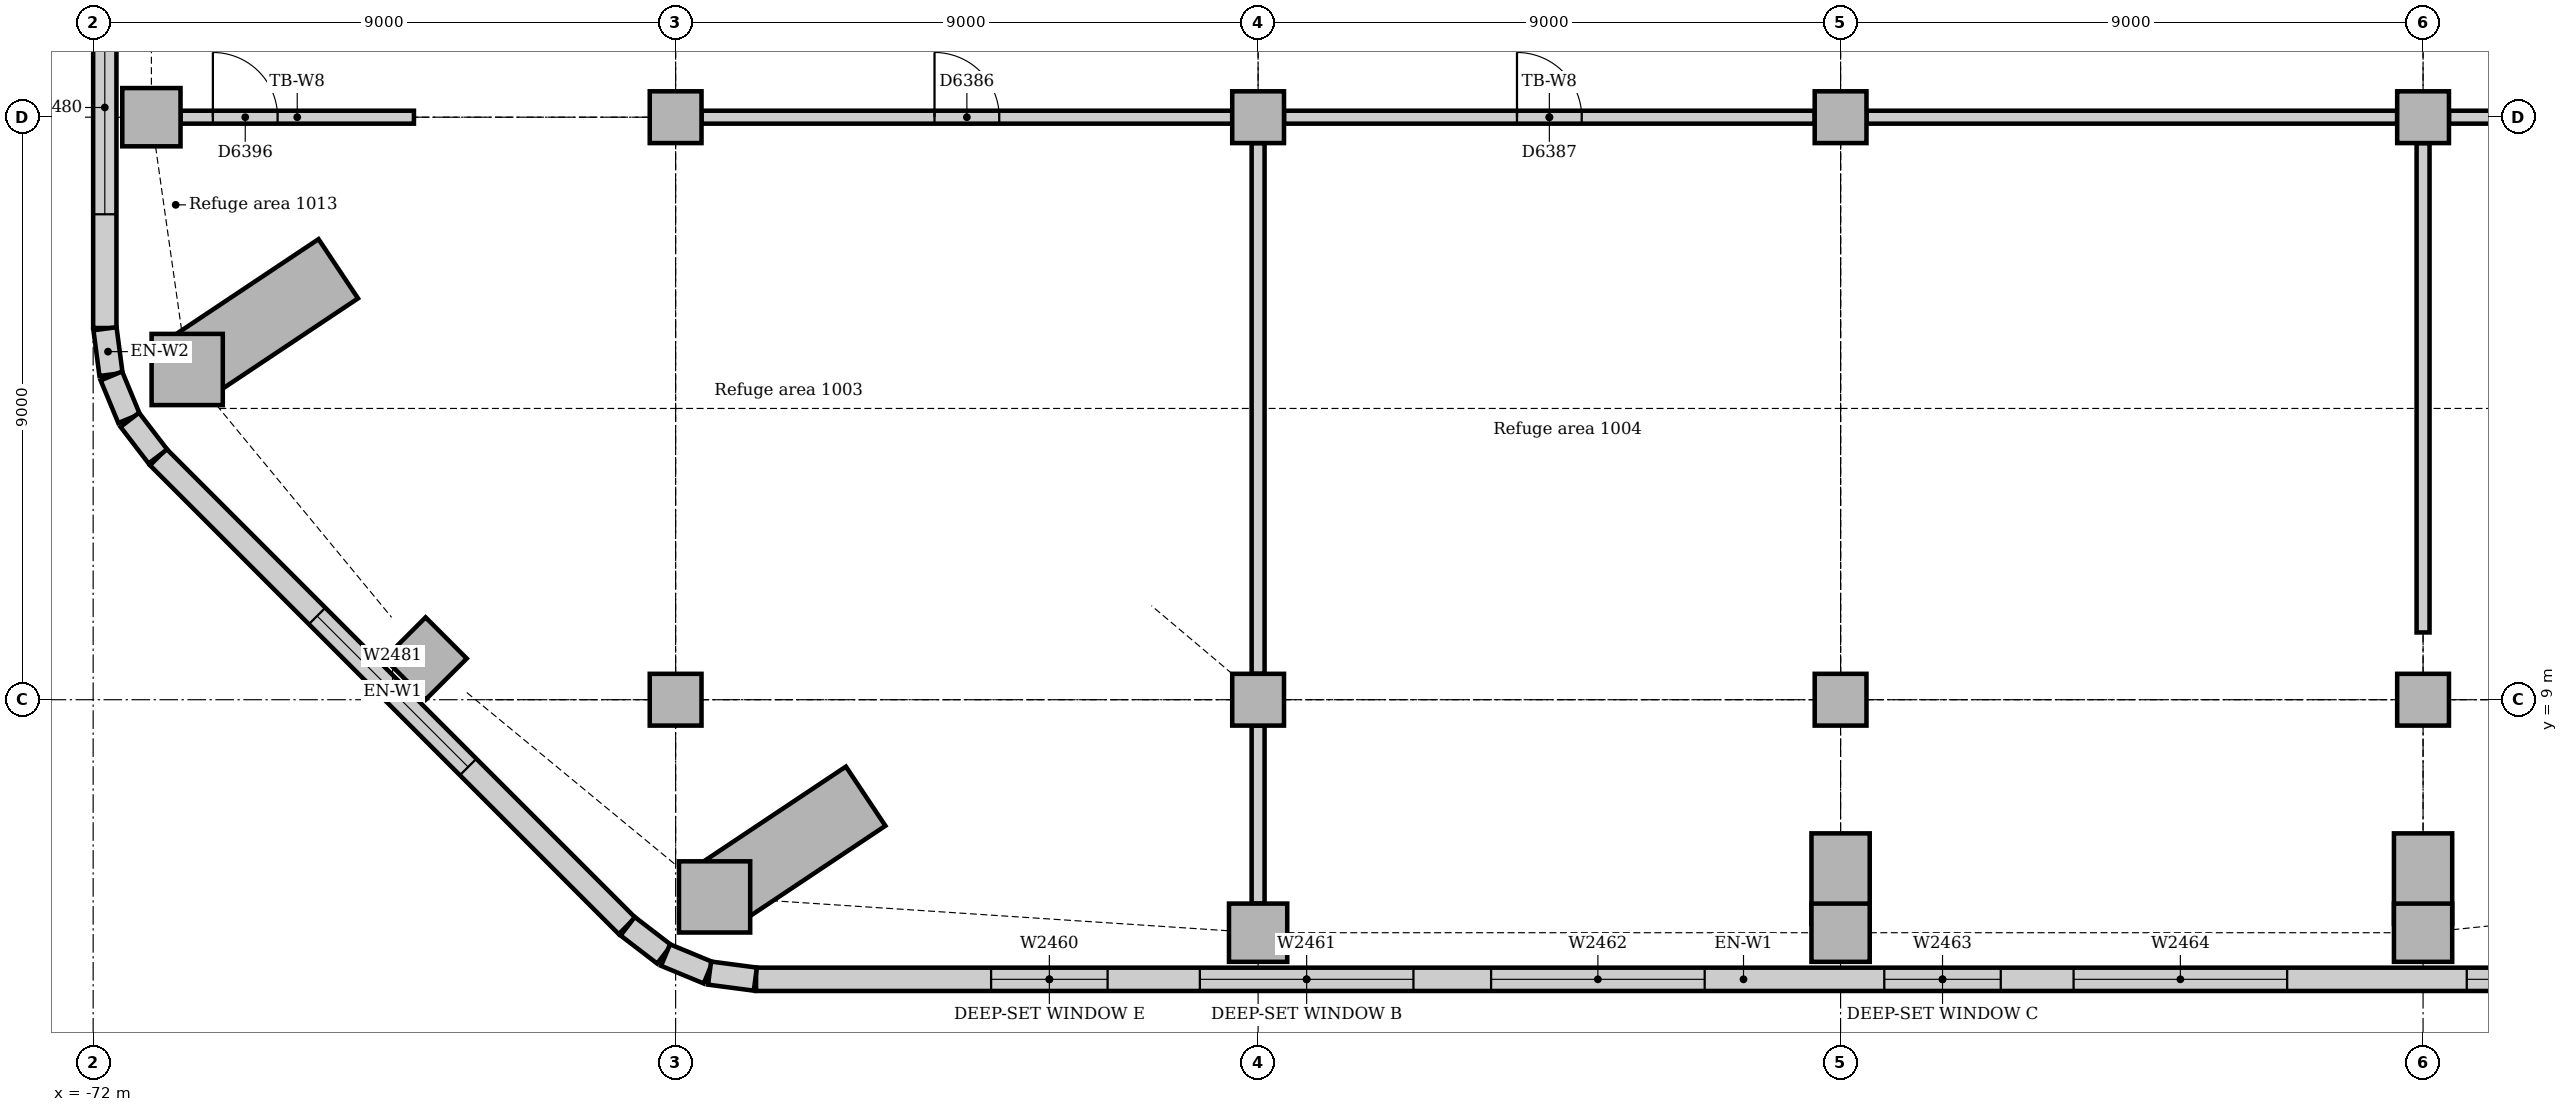
"""IFC4 building model, lengths in metres.
Left out: names, types, materials, properties, quantities, classifications, styles, units other than length and angle.
Written with IfcOpenShell. Run it as: python <this file> out.ifc"""

import sys

from ifc_helpers import new_model, si_unit, direction, frame, frame_2d, origin, origin_2d, place, context, subcontext, project, spatial, rectangle, extrude, element, fill, save


model = new_model("IFC4")
c1 = context("Model", 3, precision=1e-05, world=origin(), true_north=direction((0.0, 1.0)))
c2 = subcontext(c1, "Body", "Model", "MODEL_VIEW")
j1 = project(units=[si_unit("LENGTHUNIT", "METRE"), si_unit("PLANEANGLEUNIT", "RADIAN")], contexts=[c1])
p1 = place(None, origin())
s1 = spatial("IfcSite", under=j1, at=p1, CompositionType="ELEMENT")
p2 = place(p1, origin())
s2 = spatial("IfcBuilding", under=s1, at=p2, CompositionType="ELEMENT")
p3 = place(p2, frame((0.0, 0.0, 46.0)))
s3 = spatial("IfcBuildingStorey", under=s2, at=p3, CompositionType="ELEMENT", Elevation=46.0)
for number, where, z_axis, x_axis in (
    (1, (-62.398, 5.953, 0.0), (0.0, 0.0, 1.0), (1.0, 0.0, 0.0)),
    (2, (-70.547, 14.102, 0.0), (0.0, 0.0, 1.0), (1.0, 0.0, 0.0)),
):
    element("IfcColumn", number, at=place(p3, frame(where, z_axis=z_axis, x_axis=x_axis)), inside=s3, PredefinedType="COLUMN", context=c2, shape_type="SweptSolid", body=[
        extrude(rectangle(XDim=1.1, YDim=1.1, at=origin_2d()), origin(), (0.0, 0.0, 1.0), 4.85),
    ])
for number, where, z_axis, x_axis in (
    (3, (-54.0, 5.4, 0.0), (0.0, 0.0, 1.0), (1.0, 0.0, 0.0)),
    (4, (-45.0, 5.4, 0.0), (0.0, 0.0, 1.0), (1.0, 0.0, 0.0)),
    (5, (-36.0, 5.4, 0.0), (0.0, 0.0, 1.0), (1.0, 0.0, 0.0)),
    (6, (-71.1, 18.0, 0.0), (0.0, 0.0, 1.0), (1.0, 0.0, 0.0)),
    (7, (-66.864, 9.636, 0.0), (0.0, 0.0, 1.0), (0.707, 0.707, 0.0)),
):
    element("IfcColumn", number, at=place(p3, frame(where, z_axis=z_axis, x_axis=x_axis)), inside=s3, PredefinedType="COLUMN", context=c2, shape_type="SweptSolid", body=[
        extrude(rectangle(XDim=0.9, YDim=0.9, at=origin_2d()), origin(), (0.0, 0.0, 1.0), 4.85),
    ])
for number, where, z_axis, x_axis in (
    (8, (-63.0, 9.0, 0.0), (0.0, 0.0, 1.0), (1.0, 0.0, 0.0)),
    (9, (-63.0, 18.0, 0.0), (0.0, 0.0, 1.0), (1.0, 0.0, 0.0)),
    (10, (-54.0, 9.0, 0.0), (0.0, 0.0, 1.0), (1.0, 0.0, 0.0)),
    (11, (-54.0, 18.0, 0.0), (0.0, 0.0, 1.0), (1.0, 0.0, 0.0)),
    (12, (-45.0, 9.0, 0.0), (0.0, 0.0, 1.0), (1.0, 0.0, 0.0)),
    (13, (-45.0, 18.0, 0.0), (0.0, 0.0, 1.0), (1.0, 0.0, 0.0)),
    (14, (-36.0, 9.0, 0.0), (0.0, 0.0, 1.0), (1.0, 0.0, 0.0)),
    (15, (-36.0, 18.0, 0.0), (0.0, 0.0, 1.0), (1.0, 0.0, 0.0)),
):
    element("IfcColumn", number, at=place(p3, frame(where, z_axis=z_axis, x_axis=x_axis)), inside=s3, PredefinedType="COLUMN", context=c2, shape_type="SweptSolid", body=[
        extrude(rectangle(XDim=0.8, YDim=0.8, at=origin_2d()), origin(), (0.0, 0.0, 1.0), 4.85),
    ])
p4 = place(p3, frame((-61.757, 4.68, 0.0), z_axis=(0.0, 0.0, 1.0), x_axis=(1.0, 0.0, 0.0)))
e16 = element("IfcWall", 16, at=p4, inside=s3, PredefinedType="STANDARD", context=c2, shape_type="SweptSolid", body=[
    extrude(rectangle(XDim=30.515, YDim=0.36, at=frame_2d((15.257, 0.0))), origin(), (0.0, 0.0, 1.0), 4.85),
])
p5 = place(p4, frame((3.632, 0.0, 0.9)))
e17 = element("IfcOpeningElement", 17, at=p5, cuts=e16, PredefinedType="OPENING", context=c2, shape_type="SweptSolid", body=[
    extrude(rectangle(XDim=1.8, YDim=2.2, at=frame_2d((0.9, 1.1))), frame((0.0, 0.19, 0.0), z_axis=(0.0, -1.0, 0.0), x_axis=(1.0, 0.0, 0.0)), (0.0, 0.0, 1.0), 0.38),
])
p6 = place(p4, frame((6.857, 0.0, 0.9)))
e18 = element("IfcOpeningElement", 18, at=p6, cuts=e16, PredefinedType="OPENING", context=c2, shape_type="SweptSolid", body=[
    extrude(rectangle(XDim=3.3, YDim=2.2, at=frame_2d((1.65, 1.1))), frame((0.0, 0.19, 0.0), z_axis=(0.0, -1.0, 0.0), x_axis=(1.0, 0.0, 0.0)), (0.0, 0.0, 1.0), 0.38),
])
p7 = place(p4, frame((11.357, 0.0, 0.9)))
e19 = element("IfcOpeningElement", 19, at=p7, cuts=e16, PredefinedType="OPENING", context=c2, shape_type="SweptSolid", body=[
    extrude(rectangle(XDim=3.3, YDim=2.2, at=frame_2d((1.65, 1.1))), frame((0.0, 0.19, 0.0), z_axis=(0.0, -1.0, 0.0), x_axis=(1.0, 0.0, 0.0)), (0.0, 0.0, 1.0), 0.38),
])
p8 = place(p4, frame((17.432, 0.0, 1.2)))
e20 = element("IfcOpeningElement", 20, at=p8, cuts=e16, PredefinedType="OPENING", context=c2, shape_type="SweptSolid", body=[
    extrude(rectangle(XDim=1.8, YDim=1.2, at=frame_2d((0.9, 0.6))), frame((0.0, 0.19, 0.0), z_axis=(0.0, -1.0, 0.0), x_axis=(1.0, 0.0, 0.0)), (0.0, 0.0, 1.0), 0.38),
])
p9 = place(p4, frame((20.357, 0.0, 0.9)))
e21 = element("IfcOpeningElement", 21, at=p9, cuts=e16, PredefinedType="OPENING", context=c2, shape_type="SweptSolid", body=[
    extrude(rectangle(XDim=3.3, YDim=2.2, at=frame_2d((1.65, 1.1))), frame((0.0, 0.19, 0.0), z_axis=(0.0, -1.0, 0.0), x_axis=(1.0, 0.0, 0.0)), (0.0, 0.0, 1.0), 0.38),
])
p10 = place(p4, frame((26.432, 0.0, 1.2)))
e22 = element("IfcOpeningElement", 22, at=p10, cuts=e16, PredefinedType="OPENING", context=c2, shape_type="SweptSolid", body=[
    extrude(rectangle(XDim=1.8, YDim=1.2, at=frame_2d((0.9, 0.6))), frame((0.0, 0.19, 0.0), z_axis=(0.0, -1.0, 0.0), x_axis=(1.0, 0.0, 0.0)), (0.0, 0.0, 1.0), 0.38),
])
p11 = place(p3, frame((-71.82, 40.757, 0.0), z_axis=(0.0, 0.0, 1.0), x_axis=(0.0, -1.0, 0.0)))
e23 = element("IfcWall", 23, at=p11, inside=s3, PredefinedType="STANDARD", context=c2, shape_type="SweptSolid", body=[
    extrude(rectangle(XDim=26.015, YDim=0.36, at=frame_2d((13.007, 0.0))), origin(), (0.0, 0.0, 1.0), 4.85),
])
p12 = place(p11, frame((2.282, 0.0, 1.2)))
e24 = element("IfcOpeningElement", 24, at=p12, cuts=e23, PredefinedType="OPENING", context=c2, shape_type="SweptSolid", body=[
    extrude(rectangle(XDim=1.8, YDim=1.2, at=frame_2d((0.9, 0.6))), frame((0.0, 0.19, 0.0), z_axis=(0.0, -1.0, 0.0), x_axis=(1.0, 0.0, 0.0)), (0.0, 0.0, 1.0), 0.38),
])
p13 = place(p11, frame((6.857, 0.0, 0.9)))
e25 = element("IfcOpeningElement", 25, at=p13, cuts=e23, PredefinedType="OPENING", context=c2, shape_type="SweptSolid", body=[
    extrude(rectangle(XDim=3.3, YDim=2.2, at=frame_2d((1.65, 1.1))), frame((0.0, 0.19, 0.0), z_axis=(0.0, -1.0, 0.0), x_axis=(1.0, 0.0, 0.0)), (0.0, 0.0, 1.0), 0.38),
])
p14 = place(p11, frame((11.282, 0.0, 1.2)))
e26 = element("IfcOpeningElement", 26, at=p14, cuts=e23, PredefinedType="OPENING", context=c2, shape_type="SweptSolid", body=[
    extrude(rectangle(XDim=1.8, YDim=1.2, at=frame_2d((0.9, 0.6))), frame((0.0, 0.19, 0.0), z_axis=(0.0, -1.0, 0.0), x_axis=(1.0, 0.0, 0.0)), (0.0, 0.0, 1.0), 0.38),
])
p15 = place(p11, frame((15.857, 0.0, 0.9)))
e27 = element("IfcOpeningElement", 27, at=p15, cuts=e23, PredefinedType="OPENING", context=c2, shape_type="SweptSolid", body=[
    extrude(rectangle(XDim=3.3, YDim=2.2, at=frame_2d((1.65, 1.1))), frame((0.0, 0.19, 0.0), z_axis=(0.0, -1.0, 0.0), x_axis=(1.0, 0.0, 0.0)), (0.0, 0.0, 1.0), 0.38),
])
p16 = place(p11, frame((20.957, 0.0, 0.9)))
e28 = element("IfcOpeningElement", 28, at=p16, cuts=e23, PredefinedType="OPENING", context=c2, shape_type="SweptSolid", body=[
    extrude(rectangle(XDim=3.3, YDim=2.2, at=frame_2d((1.65, 1.1))), frame((0.0, 0.19, 0.0), z_axis=(0.0, -1.0, 0.0), x_axis=(1.0, 0.0, 0.0)), (0.0, 0.0, 1.0), 0.38),
])
p17 = place(p3, frame((-70.994, 12.749, 0.0), z_axis=(0.0, 0.0, 1.0), x_axis=(0.707106781187, -0.707106781187, 0.0)))
e29 = element("IfcWall", 29, at=p17, inside=s3, PredefinedType="STANDARD", context=c2, shape_type="SweptSolid", body=[
    extrude(rectangle(XDim=10.243, YDim=0.36, at=frame_2d((5.121, 0.0))), origin(), (0.0, 0.0, 1.0), 4.85),
])
p18 = place(p17, frame((3.471, 0.0, 0.9)))
e30 = element("IfcOpeningElement", 30, at=p18, cuts=e29, PredefinedType="OPENING", context=c2, shape_type="SweptSolid", body=[
    extrude(rectangle(XDim=3.3, YDim=2.2, at=frame_2d((1.65, 1.1))), frame((0.0, 0.19, 0.0), z_axis=(0.0, -1.0, 0.0), x_axis=(1.0, 0.0, 0.0)), (0.0, 0.0, 1.0), 0.38),
])
for number, where, z_axis, x_axis in (
    (31, (-71.817, 14.731, 0.0), (0.0, 0.0, 1.0), (0.131, -0.991, 0.0)),
    (32, (-71.718, 14.003, 0.0), (0.0, 0.0, 1.0), (0.383, -0.924, 0.0)),
):
    element("IfcWall", number, at=place(p3, frame(where, z_axis=z_axis, x_axis=x_axis)), inside=s3, PredefinedType="STANDARD", context=c2, shape_type="SweptSolid", body=[
        extrude(rectangle(XDim=0.713, YDim=0.36, at=frame_2d((0.356, 0.0))), origin(), (0.0, 0.0, 1.0), 4.85),
    ])
for number, where, z_axis, x_axis in (
    (33, (-71.434, 13.325, 0.0), (0.0, 0.0, 1.0), (0.609, -0.793, 0.0)),
    (34, (-63.741, 5.5, 0.0), (0.0, 0.0, 1.0), (0.793, -0.609, 0.0)),
):
    element("IfcWall", number, at=place(p3, frame(where, z_axis=z_axis, x_axis=x_axis)), inside=s3, PredefinedType="STANDARD", context=c2, shape_type="SweptSolid", body=[
        extrude(rectangle(XDim=0.713, YDim=0.36, at=frame_2d((0.357, 0.0))), origin(), (0.0, 0.0, 1.0), 4.85),
    ])
for number, where, z_axis, x_axis in (
    (35, (-63.156, 5.055, 0.0), (0.0, 0.0, 1.0), (0.924, -0.383, 0.0)),
    (36, (-62.476, 4.776, 0.0), (0.0, 0.0, 1.0), (0.991, -0.131, 0.0)),
):
    element("IfcWall", number, at=place(p3, frame(where, z_axis=z_axis, x_axis=x_axis)), inside=s3, PredefinedType="STANDARD", context=c2, shape_type="SweptSolid", body=[
        extrude(rectangle(XDim=0.713, YDim=0.36, at=frame_2d((0.356, 0.0))), origin(), (0.0, 0.0, 1.0), 4.85),
    ])
p19 = place(p3, frame((-35.6, 18.0, 0.0), z_axis=(0.0, 0.0, 1.0), x_axis=(1.0, 0.0, 0.0)))
e37 = element("IfcWall", 37, at=p19, inside=s3, PredefinedType="PARTITIONING", context=c2, shape_type="SweptSolid", body=[
    extrude(rectangle(XDim=7.25, YDim=0.2, at=frame_2d((3.625, 0.0))), origin(), (0.0, 0.0, 1.0), 4.158),
])
p20 = place(p19, frame((3.1, 0.0, 0.0)))
e38 = element("IfcOpeningElement", 38, at=p20, cuts=e37, PredefinedType="OPENING", context=c2, shape_type="SweptSolid", body=[
    extrude(rectangle(XDim=1.0, YDim=2.1, at=frame_2d((0.5, 1.05))), frame((0.0, 0.11, 0.0), z_axis=(0.0, -1.0, 0.0), x_axis=(1.0, 0.0, 0.0)), (0.0, 0.0, 1.0), 0.22),
])
p21 = place(p3, frame((-44.6, 18.0, 0.0), z_axis=(0.0, 0.0, 1.0), x_axis=(1.0, 0.0, 0.0)))
e39 = element("IfcWall", 39, at=p21, inside=s3, PredefinedType="PARTITIONING", context=c2, shape_type="SweptSolid", body=[
    extrude(rectangle(XDim=8.2, YDim=0.2, at=frame_2d((4.1, 0.0))), origin(), (0.0, 0.0, 1.0), 4.158),
])
p22 = place(p3, frame((-53.6, 18.0, 0.0), z_axis=(0.0, 0.0, 1.0), x_axis=(1.0, 0.0, 0.0)))
e40 = element("IfcWall", 40, at=p22, inside=s3, PredefinedType="PARTITIONING", context=c2, shape_type="SweptSolid", body=[
    extrude(rectangle(XDim=8.2, YDim=0.2, at=frame_2d((4.1, 0.0))), origin(), (0.0, 0.0, 1.0), 4.158),
])
p23 = place(p22, frame((3.6, 0.0, 0.0)))
e41 = element("IfcOpeningElement", 41, at=p23, cuts=e40, PredefinedType="OPENING", context=c2, shape_type="SweptSolid", body=[
    extrude(rectangle(XDim=1.0, YDim=2.1, at=frame_2d((0.5, 1.05))), frame((0.0, 0.11, 0.0), z_axis=(0.0, -1.0, 0.0), x_axis=(1.0, 0.0, 0.0)), (0.0, 0.0, 1.0), 0.22),
])
p24 = place(p3, frame((-62.6, 18.0, 0.0), z_axis=(0.0, 0.0, 1.0), x_axis=(1.0, 0.0, 0.0)))
e42 = element("IfcWall", 42, at=p24, inside=s3, PredefinedType="PARTITIONING", context=c2, shape_type="SweptSolid", body=[
    extrude(rectangle(XDim=8.2, YDim=0.2, at=frame_2d((4.1, 0.0))), origin(), (0.0, 0.0, 1.0), 4.158),
])
p25 = place(p24, frame((3.6, 0.0, 0.0)))
e43 = element("IfcOpeningElement", 43, at=p25, cuts=e42, PredefinedType="OPENING", context=c2, shape_type="SweptSolid", body=[
    extrude(rectangle(XDim=1.0, YDim=2.1, at=frame_2d((0.5, 1.05))), frame((0.0, 0.11, 0.0), z_axis=(0.0, -1.0, 0.0), x_axis=(1.0, 0.0, 0.0)), (0.0, 0.0, 1.0), 0.22),
])
p26 = place(p3, frame((-70.65, 18.0, 0.0), z_axis=(0.0, 0.0, 1.0), x_axis=(1.0, 0.0, 0.0)))
e44 = element("IfcWall", 44, at=p26, inside=s3, PredefinedType="PARTITIONING", context=c2, shape_type="SweptSolid", body=[
    extrude(rectangle(XDim=3.607, YDim=0.2, at=frame_2d((1.803, 0.0))), origin(), (0.0, 0.0, 1.0), 4.158),
])
p27 = place(p26, frame((0.5, 0.0, 0.0)))
e45 = element("IfcOpeningElement", 45, at=p27, cuts=e44, PredefinedType="OPENING", context=c2, shape_type="SweptSolid", body=[
    extrude(rectangle(XDim=1.0, YDim=2.1, at=frame_2d((0.5, 1.05))), frame((0.0, 0.11, 0.0), z_axis=(0.0, -1.0, 0.0), x_axis=(1.0, 0.0, 0.0)), (0.0, 0.0, 1.0), 0.22),
])
p28 = place(p3, frame((-54.0, 9.4, 0.0), z_axis=(0.0, 0.0, 1.0), x_axis=(0.0, 1.0, 0.0)))
e46 = element("IfcWall", 46, at=p28, inside=s3, PredefinedType="PARTITIONING", context=c2, shape_type="SweptSolid", body=[
    extrude(rectangle(XDim=8.2, YDim=0.2, at=frame_2d((4.1, 0.0))), origin(), (0.0, 0.0, 1.0), 4.256),
])
p29 = place(p3, frame((-54.0, 5.85, 0.0), z_axis=(0.0, 0.0, 1.0), x_axis=(0.0, 1.0, 0.0)))
e47 = element("IfcWall", 47, at=p29, inside=s3, PredefinedType="PARTITIONING", context=c2, shape_type="SweptSolid", body=[
    extrude(rectangle(XDim=2.75, YDim=0.2, at=frame_2d((1.375, 0.0))), origin(), (0.0, 0.0, 1.0), 4.85),
])
p30 = place(p3, frame((-36.0, 10.039, 0.0), z_axis=(0.0, 0.0, 1.0), x_axis=(0.0, 1.0, 0.0)))
e48 = element("IfcWall", 48, at=p30, inside=s3, PredefinedType="PARTITIONING", context=c2, shape_type="SweptSolid", body=[
    extrude(rectangle(XDim=7.561, YDim=0.2, at=frame_2d((3.78, 0.0))), origin(), (0.0, 0.0, 1.0), 4.256),
])
p31 = place(p5, origin())
e49 = element("IfcWindow", 49, at=p31, inside=s3, PartitioningType="SINGLE_PANEL", PredefinedType="WINDOW", context=c2, shape_type="SweptSolid", body=[
    extrude(rectangle(XDim=1.8, YDim=2.2, at=frame_2d((0.9, 1.1))), frame((0.0, 0.13, 0.0), z_axis=(0.0, -1.0, 0.0), x_axis=(1.0, 0.0, 0.0)), (0.0, 0.0, 1.0), 0.06),
])
fill(e17, e49)
p32 = place(p6, origin())
e50 = element("IfcWindow", 50, at=p32, inside=s3, PartitioningType="SINGLE_PANEL", PredefinedType="WINDOW", context=c2, shape_type="SweptSolid", body=[
    extrude(rectangle(XDim=3.3, YDim=2.2, at=frame_2d((1.65, 1.1))), frame((0.0, 0.13, 0.0), z_axis=(0.0, -1.0, 0.0), x_axis=(1.0, 0.0, 0.0)), (0.0, 0.0, 1.0), 0.06),
])
fill(e18, e50)
p33 = place(p7, origin())
e51 = element("IfcWindow", 51, at=p33, inside=s3, PartitioningType="SINGLE_PANEL", PredefinedType="WINDOW", context=c2, shape_type="SweptSolid", body=[
    extrude(rectangle(XDim=3.3, YDim=2.2, at=frame_2d((1.65, 1.1))), frame((0.0, 0.13, 0.0), z_axis=(0.0, -1.0, 0.0), x_axis=(1.0, 0.0, 0.0)), (0.0, 0.0, 1.0), 0.06),
])
fill(e19, e51)
p34 = place(p8, origin())
e52 = element("IfcWindow", 52, at=p34, inside=s3, PartitioningType="SINGLE_PANEL", PredefinedType="WINDOW", context=c2, shape_type="SweptSolid", body=[
    extrude(rectangle(XDim=1.8, YDim=1.2, at=frame_2d((0.9, 0.6))), frame((0.0, 0.13, 0.0), z_axis=(0.0, -1.0, 0.0), x_axis=(1.0, 0.0, 0.0)), (0.0, 0.0, 1.0), 0.06),
])
fill(e20, e52)
p35 = place(p9, origin())
e53 = element("IfcWindow", 53, at=p35, inside=s3, PartitioningType="SINGLE_PANEL", PredefinedType="WINDOW", context=c2, shape_type="SweptSolid", body=[
    extrude(rectangle(XDim=3.3, YDim=2.2, at=frame_2d((1.65, 1.1))), frame((0.0, 0.13, 0.0), z_axis=(0.0, -1.0, 0.0), x_axis=(1.0, 0.0, 0.0)), (0.0, 0.0, 1.0), 0.06),
])
fill(e21, e53)
p36 = place(p10, origin())
e54 = element("IfcWindow", 54, at=p36, inside=s3, PartitioningType="SINGLE_PANEL", PredefinedType="WINDOW", context=c2, shape_type="SweptSolid", body=[
    extrude(rectangle(XDim=1.8, YDim=1.2, at=frame_2d((0.9, 0.6))), frame((0.0, 0.13, 0.0), z_axis=(0.0, -1.0, 0.0), x_axis=(1.0, 0.0, 0.0)), (0.0, 0.0, 1.0), 0.06),
])
fill(e22, e54)
p37 = place(p16, origin())
e55 = element("IfcWindow", 55, at=p37, inside=s3, PartitioningType="SINGLE_PANEL", PredefinedType="WINDOW", context=c2, shape_type="SweptSolid", body=[
    extrude(rectangle(XDim=3.3, YDim=2.2, at=frame_2d((1.65, 1.1))), frame((0.0, 0.13, 0.0), z_axis=(0.0, -1.0, 0.0), x_axis=(1.0, 0.0, 0.0)), (0.0, 0.0, 1.0), 0.06),
])
fill(e28, e55)
p38 = place(p18, origin())
e56 = element("IfcWindow", 56, at=p38, inside=s3, PartitioningType="SINGLE_PANEL", PredefinedType="WINDOW", context=c2, shape_type="SweptSolid", body=[
    extrude(rectangle(XDim=3.3, YDim=2.2, at=frame_2d((1.65, 1.1))), frame((0.0, 0.13, 0.0), z_axis=(0.0, -1.0, 0.0), x_axis=(1.0, 0.0, 0.0)), (0.0, 0.0, 1.0), 0.06),
])
fill(e30, e56)
p39 = place(p25, origin())
e57 = element("IfcDoor", 57, at=p39, inside=s3, OperationType="SINGLE_SWING_LEFT", PredefinedType="DOOR", context=c2, shape_type="SweptSolid", body=[
    extrude(rectangle(XDim=1.0, YDim=2.1, at=frame_2d((0.5, 1.05))), frame((0.0, 0.025, 0.0), z_axis=(0.0, -1.0, 0.0), x_axis=(1.0, 0.0, 0.0)), (0.0, 0.0, 1.0), 0.05),
])
fill(e43, e57)
p40 = place(p23, origin())
e58 = element("IfcDoor", 58, at=p40, inside=s3, OperationType="SINGLE_SWING_LEFT", PredefinedType="DOOR", context=c2, shape_type="SweptSolid", body=[
    extrude(rectangle(XDim=1.0, YDim=2.1, at=frame_2d((0.5, 1.05))), frame((0.0, 0.025, 0.0), z_axis=(0.0, -1.0, 0.0), x_axis=(1.0, 0.0, 0.0)), (0.0, 0.0, 1.0), 0.05),
])
fill(e41, e58)
p41 = place(p27, origin())
e59 = element("IfcDoor", 59, at=p41, inside=s3, OperationType="SINGLE_SWING_LEFT", PredefinedType="DOOR", context=c2, shape_type="SweptSolid", body=[
    extrude(rectangle(XDim=1.0, YDim=2.1, at=frame_2d((0.5, 1.05))), frame((0.0, 0.025, 0.0), z_axis=(0.0, -1.0, 0.0), x_axis=(1.0, 0.0, 0.0)), (0.0, 0.0, 1.0), 0.05),
])
fill(e45, e59)
save(model, sys.argv[1])
